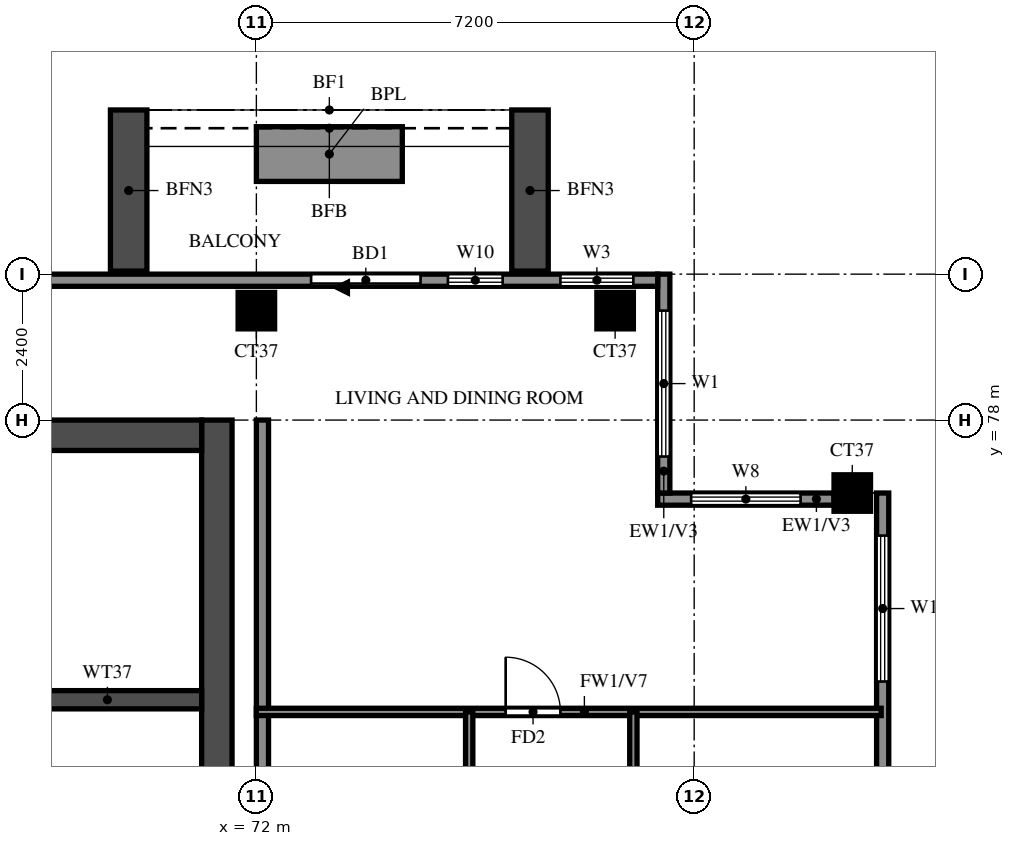
"""IFC4 building model, lengths in metres.
Left out: names, types, materials, properties, quantities, classifications, styles, units other than length and angle.
Written with IfcOpenShell. Run it as: python <this file> out.ifc"""

import sys

from ifc_helpers import new_model, si_unit, direction, frame, frame_2d, origin, origin_2d, place, context, subcontext, project, spatial, rectangle, extrude, source, transform, mapped, element, fill, save


model = new_model("IFC4")
c1 = context("Model", 3, precision=1e-05, world=origin(), true_north=direction((0.0, 1.0)))
c2 = subcontext(c1, "Body", "Model", "MODEL_VIEW")
j1 = project(units=[si_unit("LENGTHUNIT", "METRE"), si_unit("PLANEANGLEUNIT", "RADIAN")], contexts=[c1])
p1 = place(None, origin())
s1 = spatial("IfcSite", under=j1, at=p1, CompositionType="ELEMENT")
p2 = place(p1, origin())
s2 = spatial("IfcBuilding", under=s1, at=p2, CompositionType="ELEMENT")
p3 = place(p2, frame((0.0, 0.0, 264.0)))
s3 = spatial("IfcBuildingStorey", under=s2, at=p3, CompositionType="ELEMENT", Elevation=264.0)
m1 = source(origin(), c2, "Body", "SweptSolid", [
    extrude(rectangle(XDim=0.6, YDim=0.6, at=origin_2d()), origin(), (0.0, 0.0, 1.0), 3.22),
])
for number, where, z_axis, x_axis in (
    (1, (81.8, 76.8, 0.0), (0.0, 0.0, 1.0), (1.0, 0.0, 0.0)),
    (2, (72.0, 79.8, 0.0), (0.0, 0.0, 1.0), (1.0, 0.0, 0.0)),
    (3, (77.9, 79.8, 0.0), (0.0, 0.0, 1.0), (1.0, 0.0, 0.0)),
):
    element("IfcColumn", number, at=place(p3, frame(where, z_axis=z_axis, x_axis=x_axis)), inside=s3, PredefinedType="COLUMN", context=c2, shape_type="MappedRepresentation", body=[
        mapped(m1, transform((0.0, 0.0, 0.0))),
    ])
p4 = place(p3, frame((71.35, 66.15, 0.0), z_axis=(0.0, 0.0, 1.0), x_axis=(0.0, 1.0, 0.0)))
e4 = element("IfcWall", 4, at=p4, inside=s3, PredefinedType="SHEAR", context=c2, shape_type="SweptSolid", body=[
    extrude(rectangle(XDim=11.85, YDim=0.5, at=frame_2d((5.925, 0.0))), origin(), (0.0, 0.0, 1.0), 3.22),
])
p5 = place(p3, frame((29.7, 77.75, 0.0), z_axis=(0.0, 0.0, 1.0), x_axis=(1.0, 0.0, 0.0)))
e5 = element("IfcWall", 5, at=p5, inside=s3, PredefinedType="SHEAR", context=c2, shape_type="SweptSolid", body=[
    extrude(rectangle(XDim=41.4, YDim=0.5, at=frame_2d((20.7, 0.0))), origin(), (0.0, 0.0, 1.0), 3.22),
])
p6 = place(p3, frame((68.0, 73.4, 0.0), z_axis=(0.0, 0.0, 1.0), x_axis=(1.0, 0.0, 0.0)))
e6 = element("IfcWall", 6, at=p6, inside=s3, PredefinedType="SHEAR", context=c2, shape_type="SweptSolid", body=[
    extrude(rectangle(XDim=3.1, YDim=0.3, at=frame_2d((1.55, 0.0))), origin(), (0.0, 0.0, 1.0), 3.22),
])
p7 = place(p3, frame((82.3, 48.2, 0.0), z_axis=(0.0, 0.0, 1.0), x_axis=(0.0, 1.0, 0.0)))
e7 = element("IfcWall", 7, at=p7, inside=s3, PredefinedType="SOLIDWALL", context=c2, shape_type="SweptSolid", body=[
    extrude(rectangle(XDim=28.6, YDim=0.2, at=frame_2d((14.3, 0.0))), origin(), (0.0, 0.0, 1.0), 3.22),
])
p8 = place(p7, frame((7.9, 0.0, 0.0)))
e8 = element("IfcOpeningElement", 8, at=p8, cuts=e7, PredefinedType="OPENING", context=c2, shape_type="SweptSolid", body=[
    extrude(rectangle(XDim=1.8, YDim=2.4, at=frame_2d((0.9, 1.2))), frame((0.0, 0.11, 0.0), z_axis=(0.0, -1.0, 0.0), x_axis=(1.0, 0.0, 0.0)), (0.0, 0.0, 1.0), 0.22),
])
p9 = place(p7, frame((0.6, 0.0, 0.6)))
e9 = element("IfcOpeningElement", 9, at=p9, cuts=e7, PredefinedType="OPENING", context=c2, shape_type="SweptSolid", body=[
    extrude(rectangle(XDim=2.4, YDim=2.4, at=frame_2d((1.2, 1.2))), frame((0.0, 0.11, 0.0), z_axis=(0.0, -1.0, 0.0), x_axis=(1.0, 0.0, 0.0)), (0.0, 0.0, 1.0), 0.22),
])
p10 = place(p7, frame((3.55, 0.0, 0.6)))
e10 = element("IfcOpeningElement", 10, at=p10, cuts=e7, PredefinedType="OPENING", context=c2, shape_type="SweptSolid", body=[
    extrude(rectangle(XDim=0.9, YDim=2.4, at=frame_2d((0.45, 1.2))), frame((0.0, 0.11, 0.0), z_axis=(0.0, -1.0, 0.0), x_axis=(1.0, 0.0, 0.0)), (0.0, 0.0, 1.0), 0.22),
])
p11 = place(p7, frame((5.5, 0.0, 0.6)))
e11 = element("IfcOpeningElement", 11, at=p11, cuts=e7, PredefinedType="OPENING", context=c2, shape_type="SweptSolid", body=[
    extrude(rectangle(XDim=1.8, YDim=2.4, at=frame_2d((0.9, 1.2))), frame((0.0, 0.11, 0.0), z_axis=(0.0, -1.0, 0.0), x_axis=(1.0, 0.0, 0.0)), (0.0, 0.0, 1.0), 0.22),
])
p12 = place(p7, frame((12.1, 0.0, 0.6)))
e12 = element("IfcOpeningElement", 12, at=p12, cuts=e7, PredefinedType="OPENING", context=c2, shape_type="SweptSolid", body=[
    extrude(rectangle(XDim=1.8, YDim=2.4, at=frame_2d((0.9, 1.2))), frame((0.0, 0.11, 0.0), z_axis=(0.0, -1.0, 0.0), x_axis=(1.0, 0.0, 0.0)), (0.0, 0.0, 1.0), 0.22),
])
p13 = place(p7, frame((14.8, 0.0, 0.6)))
e13 = element("IfcOpeningElement", 13, at=p13, cuts=e7, PredefinedType="OPENING", context=c2, shape_type="SweptSolid", body=[
    extrude(rectangle(XDim=2.4, YDim=2.4, at=frame_2d((1.2, 1.2))), frame((0.0, 0.11, 0.0), z_axis=(0.0, -1.0, 0.0), x_axis=(1.0, 0.0, 0.0)), (0.0, 0.0, 1.0), 0.22),
])
p14 = place(p7, frame((18.4, 0.0, 0.6)))
e14 = element("IfcOpeningElement", 14, at=p14, cuts=e7, PredefinedType="OPENING", context=c2, shape_type="SweptSolid", body=[
    extrude(rectangle(XDim=2.4, YDim=2.4, at=frame_2d((1.2, 1.2))), frame((0.0, 0.11, 0.0), z_axis=(0.0, -1.0, 0.0), x_axis=(1.0, 0.0, 0.0)), (0.0, 0.0, 1.0), 0.22),
])
p15 = place(p7, frame((22.75, 0.0, 1.5)))
e15 = element("IfcOpeningElement", 15, at=p15, cuts=e7, PredefinedType="OPENING", context=c2, shape_type="SweptSolid", body=[
    extrude(rectangle(XDim=0.9, YDim=0.9, at=frame_2d((0.45, 0.45))), frame((0.0, 0.11, 0.0), z_axis=(0.0, -1.0, 0.0), x_axis=(1.0, 0.0, 0.0)), (0.0, 0.0, 1.0), 0.22),
])
p16 = place(p7, frame((25.5, 0.0, 0.6)))
e16 = element("IfcOpeningElement", 16, at=p16, cuts=e7, PredefinedType="OPENING", context=c2, shape_type="SweptSolid", body=[
    extrude(rectangle(XDim=2.4, YDim=2.4, at=frame_2d((1.2, 1.2))), frame((0.0, 0.11, 0.0), z_axis=(0.0, -1.0, 0.0), x_axis=(1.0, 0.0, 0.0)), (0.0, 0.0, 1.0), 0.22),
])
p17 = place(p3, frame((81.5, 76.7, 0.0), z_axis=(0.0, 0.0, 1.0), x_axis=(-1.0, 0.0, 0.0)))
e17 = element("IfcWall", 17, at=p17, inside=s3, PredefinedType="SOLIDWALL", context=c2, shape_type="SweptSolid", body=[
    extrude(rectangle(XDim=2.9, YDim=0.2, at=frame_2d((1.45, 0.0))), origin(), (0.0, 0.0, 1.0), 3.22),
])
p18 = place(p17, frame((0.55, 0.0, 0.6)))
e18 = element("IfcOpeningElement", 18, at=p18, cuts=e17, PredefinedType="OPENING", context=c2, shape_type="SweptSolid", body=[
    extrude(rectangle(XDim=1.8, YDim=2.4, at=frame_2d((0.9, 1.2))), frame((0.0, 0.11, 0.0), z_axis=(0.0, -1.0, 0.0), x_axis=(1.0, 0.0, 0.0)), (0.0, 0.0, 1.0), 0.22),
])
p19 = place(p3, frame((78.7, 76.8, 0.0), z_axis=(0.0, 0.0, 1.0), x_axis=(0.0, 1.0, 0.0)))
e19 = element("IfcWall", 19, at=p19, inside=s3, PredefinedType="SOLIDWALL", context=c2, shape_type="SweptSolid", body=[
    extrude(rectangle(XDim=3.6, YDim=0.2, at=frame_2d((1.8, 0.0))), origin(), (0.0, 0.0, 1.0), 3.22),
])
p20 = place(p19, frame((0.6, 0.0, 0.6)))
e20 = element("IfcOpeningElement", 20, at=p20, cuts=e19, PredefinedType="OPENING", context=c2, shape_type="SweptSolid", body=[
    extrude(rectangle(XDim=2.4, YDim=2.4, at=frame_2d((1.2, 1.2))), frame((0.0, 0.11, 0.0), z_axis=(0.0, -1.0, 0.0), x_axis=(1.0, 0.0, 0.0)), (0.0, 0.0, 1.0), 0.22),
])
p21 = place(p3, frame((78.6, 80.3, 0.0), z_axis=(0.0, 0.0, 1.0), x_axis=(-1.0, 0.0, 0.0)))
e21 = element("IfcWall", 21, at=p21, inside=s3, PredefinedType="SOLIDWALL", context=c2, shape_type="SweptSolid", body=[
    extrude(rectangle(XDim=56.6, YDim=0.2, at=frame_2d((28.3, 0.0))), origin(), (0.0, 0.0, 1.0), 3.22),
])
p22 = place(p21, frame((3.9, 0.0, 0.0)))
e22 = element("IfcOpeningElement", 22, at=p22, cuts=e21, PredefinedType="OPENING", context=c2, shape_type="SweptSolid", body=[
    extrude(rectangle(XDim=1.8, YDim=2.4, at=frame_2d((0.9, 1.2))), frame((0.0, 0.11, 0.0), z_axis=(0.0, -1.0, 0.0), x_axis=(1.0, 0.0, 0.0)), (0.0, 0.0, 1.0), 0.22),
])
p23 = place(p21, frame((50.433, 0.0, 0.6)))
e23 = element("IfcOpeningElement", 23, at=p23, cuts=e21, PredefinedType="OPENING", context=c2, shape_type="SweptSolid", body=[
    extrude(rectangle(XDim=2.4, YDim=2.4, at=frame_2d((1.2, 1.2))), frame((0.0, 0.11, 0.0), z_axis=(0.0, -1.0, 0.0), x_axis=(1.0, 0.0, 0.0)), (0.0, 0.0, 1.0), 0.22),
])
p24 = place(p21, frame((53.367, 0.0, 0.6)))
e24 = element("IfcOpeningElement", 24, at=p24, cuts=e21, PredefinedType="OPENING", context=c2, shape_type="SweptSolid", body=[
    extrude(rectangle(XDim=2.4, YDim=2.4, at=frame_2d((1.2, 1.2))), frame((0.0, 0.11, 0.0), z_axis=(0.0, -1.0, 0.0), x_axis=(1.0, 0.0, 0.0)), (0.0, 0.0, 1.0), 0.22),
])
p25 = place(p21, frame((0.4, 0.0, 0.6)))
e25 = element("IfcOpeningElement", 25, at=p25, cuts=e21, PredefinedType="OPENING", context=c2, shape_type="SweptSolid", body=[
    extrude(rectangle(XDim=1.2, YDim=2.4, at=frame_2d((0.6, 1.2))), frame((0.0, 0.11, 0.0), z_axis=(0.0, -1.0, 0.0), x_axis=(1.0, 0.0, 0.0)), (0.0, 0.0, 1.0), 0.22),
])
p26 = place(p21, frame((2.55, 0.0, 0.6)))
e26 = element("IfcOpeningElement", 26, at=p26, cuts=e21, PredefinedType="OPENING", context=c2, shape_type="SweptSolid", body=[
    extrude(rectangle(XDim=0.9, YDim=2.4, at=frame_2d((0.45, 1.2))), frame((0.0, 0.11, 0.0), z_axis=(0.0, -1.0, 0.0), x_axis=(1.0, 0.0, 0.0)), (0.0, 0.0, 1.0), 0.22),
])
for number, where, z_axis, x_axis in (
    (27, (76.5, 80.45, 0.0), (0.0, 0.0, 1.0), (0.0, 1.0, 0.0)),
    (28, (69.9, 80.45, 0.0), (0.0, 0.0, 1.0), (0.0, 1.0, 0.0)),
):
    element("IfcWall", number, at=place(p3, frame(where, z_axis=z_axis, x_axis=x_axis)), inside=s3, PredefinedType="SOLIDWALL", context=c2, shape_type="SweptSolid", body=[
        extrude(rectangle(XDim=2.65, YDim=0.6, at=frame_2d((1.325, 0.0))), origin(), (0.0, 0.0, 1.0), 2.85),
    ])
p27 = place(p3, frame((74.4, 82.375, 0.0), z_axis=(0.0, 0.0, 1.0), x_axis=(-1.0, 0.0, 0.0)))
e29 = element("IfcWall", 29, at=p27, inside=s3, PredefinedType="SOLIDWALL", context=c2, shape_type="SweptSolid", body=[
    extrude(rectangle(XDim=2.4, YDim=0.9, at=frame_2d((1.2, 0.0))), origin(), (0.0, 0.0, 1.0), 0.9),
])
p28 = place(p3, frame((72.1, 62.4, 0.0), z_axis=(0.0, 0.0, 1.0), x_axis=(0.0, 1.0, 0.0)))
e30 = element("IfcWall", 30, at=p28, inside=s3, PredefinedType="SOLIDWALL", context=c2, shape_type="SweptSolid", body=[
    extrude(rectangle(XDim=15.6, YDim=0.2, at=frame_2d((7.8, 0.0))), origin(), (0.0, 0.0, 1.0), 3.22),
])
p29 = place(p3, frame((72.0, 73.2, 0.0), z_axis=(0.0, 0.0, 1.0), x_axis=(1.0, 0.0, 0.0)))
e31 = element("IfcWall", 31, at=p29, inside=s3, PredefinedType="PARTITIONING", context=c2, shape_type="SweptSolid", body=[
    extrude(rectangle(XDim=10.275, YDim=0.12, at=frame_2d((5.137, 0.0))), origin(), (0.0, 0.0, 1.0), 2.32),
])
p30 = place(p29, frame((4.1, 0.0, 0.0)))
e32 = element("IfcOpeningElement", 32, at=p30, cuts=e31, PredefinedType="OPENING", context=c2, shape_type="SweptSolid", body=[
    extrude(rectangle(XDim=0.9, YDim=2.1, at=frame_2d((0.45, 1.05))), frame((0.0, 0.07, 0.0), z_axis=(0.0, -1.0, 0.0), x_axis=(1.0, 0.0, 0.0)), (0.0, 0.0, 1.0), 0.14),
])
p31 = place(p3, frame((75.5, 64.8, 0.0), z_axis=(0.0, 0.0, 1.0), x_axis=(0.0, 1.0, 0.0)))
e33 = element("IfcWall", 33, at=p31, inside=s3, PredefinedType="PARTITIONING", context=c2, shape_type="SweptSolid", body=[
    extrude(rectangle(XDim=8.4, YDim=0.12, at=frame_2d((4.2, 0.0))), origin(), (0.0, 0.0, 1.0), 3.22),
])
p32 = place(p31, frame((5.4, 0.0, 0.0)))
e34 = element("IfcOpeningElement", 34, at=p32, cuts=e33, PredefinedType="OPENING", context=c2, shape_type="SweptSolid", body=[
    extrude(rectangle(XDim=0.9, YDim=2.1, at=frame_2d((0.45, 1.05))), frame((0.0, 0.07, 0.0), z_axis=(0.0, -1.0, 0.0), x_axis=(1.0, 0.0, 0.0)), (0.0, 0.0, 1.0), 0.14),
])
p33 = place(p3, frame((78.2, 69.6, 0.0), z_axis=(0.0, 0.0, 1.0), x_axis=(0.0, 1.0, 0.0)))
e35 = element("IfcWall", 35, at=p33, inside=s3, PredefinedType="PARTITIONING", context=c2, shape_type="SweptSolid", body=[
    extrude(rectangle(XDim=3.6, YDim=0.12, at=frame_2d((1.8, 0.0))), origin(), (0.0, 0.0, 1.0), 3.22),
])
p34 = place(p16, origin())
e36 = element("IfcWindow", 36, at=p34, inside=s3, PartitioningType="DOUBLE_PANEL_VERTICAL", PredefinedType="WINDOW", context=c2, shape_type="SweptSolid", body=[
    extrude(rectangle(XDim=2.4, YDim=2.4, at=frame_2d((1.2, 1.2))), frame((0.0, 0.03, 0.0), z_axis=(0.0, -1.0, 0.0), x_axis=(1.0, 0.0, 0.0)), (0.0, 0.0, 1.0), 0.06),
])
fill(e16, e36)
p35 = place(p18, origin())
e37 = element("IfcWindow", 37, at=p35, inside=s3, PartitioningType="DOUBLE_PANEL_VERTICAL", PredefinedType="WINDOW", context=c2, shape_type="SweptSolid", body=[
    extrude(rectangle(XDim=1.8, YDim=2.4, at=frame_2d((0.9, 1.2))), frame((0.0, 0.03, 0.0), z_axis=(0.0, -1.0, 0.0), x_axis=(1.0, 0.0, 0.0)), (0.0, 0.0, 1.0), 0.06),
])
fill(e18, e37)
p36 = place(p20, origin())
e38 = element("IfcWindow", 38, at=p36, inside=s3, PartitioningType="DOUBLE_PANEL_VERTICAL", PredefinedType="WINDOW", context=c2, shape_type="SweptSolid", body=[
    extrude(rectangle(XDim=2.4, YDim=2.4, at=frame_2d((1.2, 1.2))), frame((0.0, 0.03, 0.0), z_axis=(0.0, -1.0, 0.0), x_axis=(1.0, 0.0, 0.0)), (0.0, 0.0, 1.0), 0.06),
])
fill(e20, e38)
p37 = place(p22, origin())
e39 = element("IfcDoor", 39, at=p37, inside=s3, OperationType="DOUBLE_DOOR_SLIDING", PredefinedType="DOOR", context=c2, shape_type="SweptSolid", body=[
    extrude(rectangle(XDim=1.8, YDim=2.4, at=frame_2d((0.9, 1.2))), frame((0.0, 0.025, 0.0), z_axis=(0.0, -1.0, 0.0), x_axis=(1.0, 0.0, 0.0)), (0.0, 0.0, 1.0), 0.05),
])
fill(e22, e39)
p38 = place(p25, origin())
e40 = element("IfcWindow", 40, at=p38, inside=s3, PartitioningType="SINGLE_PANEL", PredefinedType="WINDOW", context=c2, shape_type="SweptSolid", body=[
    extrude(rectangle(XDim=1.2, YDim=2.4, at=frame_2d((0.6, 1.2))), frame((0.0, 0.03, 0.0), z_axis=(0.0, -1.0, 0.0), x_axis=(1.0, 0.0, 0.0)), (0.0, 0.0, 1.0), 0.06),
])
fill(e25, e40)
p39 = place(p26, origin())
e41 = element("IfcWindow", 41, at=p39, inside=s3, PartitioningType="SINGLE_PANEL", PredefinedType="WINDOW", context=c2, shape_type="SweptSolid", body=[
    extrude(rectangle(XDim=0.9, YDim=2.4, at=frame_2d((0.45, 1.2))), frame((0.0, 0.03, 0.0), z_axis=(0.0, -1.0, 0.0), x_axis=(1.0, 0.0, 0.0)), (0.0, 0.0, 1.0), 0.06),
])
fill(e26, e41)
p40 = place(p30, origin())
e42 = element("IfcDoor", 42, at=p40, inside=s3, OperationType="SINGLE_SWING_RIGHT", PredefinedType="DOOR", context=c2, shape_type="SweptSolid", body=[
    extrude(rectangle(XDim=0.9, YDim=2.1, at=frame_2d((0.45, 1.05))), frame((0.0, 0.025, 0.0), z_axis=(0.0, -1.0, 0.0), x_axis=(1.0, 0.0, 0.0)), (0.0, 0.0, 1.0), 0.05),
])
fill(e32, e42)
save(model, sys.argv[1])
